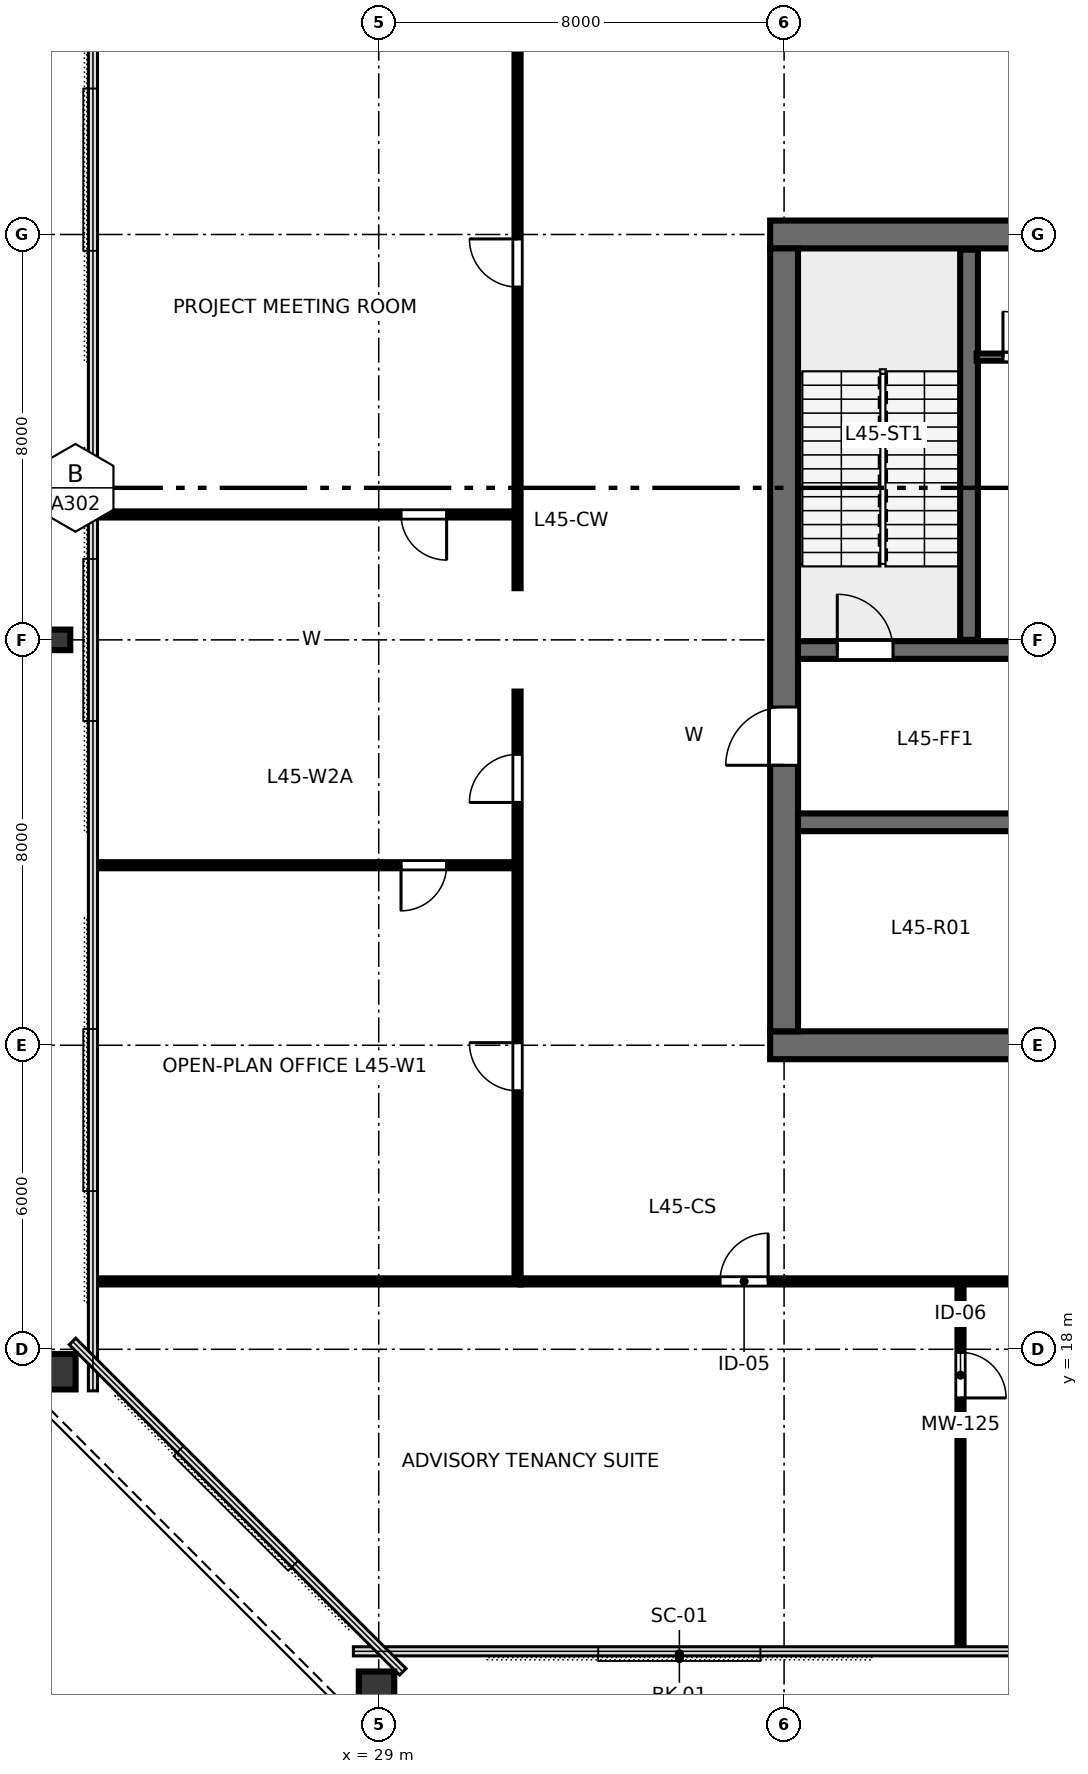
"""IFC4 building model, lengths in metres.
Left out: names, types, materials, properties, quantities, classifications, styles, units other than length and angle.
Written with IfcOpenShell. Run it as: python <this file> out.ifc"""

import sys

from ifc_helpers import new_model, si_unit, direction, frame, frame_2d, origin, origin_2d, place, context, subcontext, project, spatial, rectangle, hollow_rectangle, i_section, extrude, element, fill, save


model = new_model("IFC4")
c1 = context("Model", 3, precision=1e-05, world=origin(), true_north=direction((0.0, 1.0)))
c2 = subcontext(c1, "Body", "Model", "MODEL_VIEW")
j1 = project(units=[si_unit("LENGTHUNIT", "METRE"), si_unit("PLANEANGLEUNIT", "RADIAN")], contexts=[c1])
p1 = place(None, origin())
s1 = spatial("IfcSite", under=j1, at=p1, CompositionType="ELEMENT")
p2 = place(p1, origin())
s2 = spatial("IfcBuilding", under=s1, at=p2, CompositionType="ELEMENT")
p3 = place(p2, frame((0.0, 0.0, 172.0)))
s3 = spatial("IfcBuildingStorey", under=s2, at=p3, CompositionType="ELEMENT", Elevation=172.0)
p4 = place(p3, frame((36.725, 24.0, 0.0), z_axis=(0.0, 0.0, 1.0), x_axis=(1.0, 0.0, 0.0)))
e1 = element("IfcWall", 1, at=p4, inside=s3, PredefinedType="SHEAR", context=c2, shape_type="SweptSolid", body=[
    extrude(rectangle(XDim=18.55, YDim=0.55, at=frame_2d((9.275, 0.0))), origin(), (0.0, 0.0, 1.0), 4.76),
])
p5 = place(p4, frame((8.275, 0.0, 0.0)))
e2 = element("IfcOpeningElement", 2, at=p5, cuts=e1, PredefinedType="OPENING", context=c2, shape_type="SweptSolid", body=[
    extrude(rectangle(XDim=1.6, YDim=2.15, at=frame_2d((0.8, 1.075))), frame((0.0, 0.285, 0.0), z_axis=(0.0, -1.0, 0.0), x_axis=(1.0, 0.0, 0.0)), (0.0, 0.0, 1.0), 0.57),
])
p6 = place(p4, frame((13.675, 0.0, 0.0)))
e3 = element("IfcOpeningElement", 3, at=p6, cuts=e1, PredefinedType="OPENING", context=c2, shape_type="SweptSolid", body=[
    extrude(rectangle(XDim=1.6, YDim=2.15, at=frame_2d((0.8, 1.075))), frame((0.0, 0.285, 0.0), z_axis=(0.0, -1.0, 0.0), x_axis=(1.0, 0.0, 0.0)), (0.0, 0.0, 1.0), 0.57),
])
p7 = place(p3, frame((36.725, 40.0, 0.0), z_axis=(0.0, 0.0, 1.0), x_axis=(1.0, 0.0, 0.0)))
e4 = element("IfcWall", 4, at=p7, inside=s3, PredefinedType="SHEAR", context=c2, shape_type="SweptSolid", body=[
    extrude(rectangle(XDim=18.55, YDim=0.55, at=frame_2d((9.275, 0.0))), origin(), (0.0, 0.0, 1.0), 4.76),
])
p8 = place(p7, frame((8.775, 0.0, 0.0)))
e5 = element("IfcOpeningElement", 5, at=p8, cuts=e4, PredefinedType="OPENING", context=c2, shape_type="SweptSolid", body=[
    extrude(rectangle(XDim=1.0, YDim=2.15, at=frame_2d((0.5, 1.075))), frame((0.0, 0.285, 0.0), z_axis=(0.0, -1.0, 0.0), x_axis=(1.0, 0.0, 0.0)), (0.0, 0.0, 1.0), 0.57),
])
p9 = place(p3, frame((37.0, 24.275, 0.0), z_axis=(0.0, 0.0, 1.0), x_axis=(0.0, 1.0, 0.0)))
e6 = element("IfcWall", 6, at=p9, inside=s3, PredefinedType="SHEAR", context=c2, shape_type="SweptSolid", body=[
    extrude(rectangle(XDim=15.45, YDim=0.55, at=frame_2d((7.725, 0.0))), origin(), (0.0, 0.0, 1.0), 4.76),
])
p10 = place(p9, frame((5.25, 0.0, 0.0)))
e7 = element("IfcOpeningElement", 7, at=p10, cuts=e6, PredefinedType="OPENING", context=c2, shape_type="SweptSolid", body=[
    extrude(rectangle(XDim=1.15, YDim=2.15, at=frame_2d((0.575, 1.075))), frame((0.0, 0.285, 0.0), z_axis=(0.0, -1.0, 0.0), x_axis=(1.0, 0.0, 0.0)), (0.0, 0.0, 1.0), 0.57),
])
p11 = place(p3, frame((37.275, 31.8, 0.0), z_axis=(0.0, 0.0, 1.0), x_axis=(1.0, 0.0, 0.0)))
e8 = element("IfcWall", 8, at=p11, inside=s3, PredefinedType="SHEAR", context=c2, shape_type="SweptSolid", body=[
    extrude(rectangle(XDim=17.45, YDim=0.35, at=frame_2d((8.725, 0.0))), origin(), (0.0, 0.0, 1.0), 4.76),
])
p12 = place(p11, frame((0.775, 0.0, 0.0)))
e9 = element("IfcOpeningElement", 9, at=p12, cuts=e8, PredefinedType="OPENING", context=c2, shape_type="SweptSolid", body=[
    extrude(rectangle(XDim=1.1, YDim=2.15, at=frame_2d((0.55, 1.075))), frame((0.0, 0.185, 0.0), z_axis=(0.0, -1.0, 0.0), x_axis=(1.0, 0.0, 0.0)), (0.0, 0.0, 1.0), 0.37),
])
p13 = place(p11, frame((14.675, 0.0, 0.0)))
e10 = element("IfcOpeningElement", 10, at=p13, cuts=e8, PredefinedType="OPENING", context=c2, shape_type="SweptSolid", body=[
    extrude(rectangle(XDim=1.1, YDim=2.15, at=frame_2d((0.55, 1.075))), frame((0.0, 0.185, 0.0), z_axis=(0.0, -1.0, 0.0), x_axis=(1.0, 0.0, 0.0)), (0.0, 0.0, 1.0), 0.37),
])
p14 = place(p3, frame((37.275, 28.4, 0.0), z_axis=(0.0, 0.0, 1.0), x_axis=(1.0, 0.0, 0.0)))
e11 = element("IfcWall", 11, at=p14, inside=s3, PredefinedType="SHEAR", context=c2, shape_type="SweptSolid", body=[
    extrude(rectangle(XDim=17.45, YDim=0.35, at=frame_2d((8.725, 0.0))), origin(), (0.0, 0.0, 1.0), 4.76),
])
p15 = place(p3, frame((28.957, 11.217, 0.0), z_axis=(0.062460790535, 0.046397982813, 0.996968342946), x_axis=(-0.596311896623, 0.802752839886, 0.0)))
e12 = element("IfcColumn", 12, at=p15, inside=s3, PredefinedType="COLUMN", context=c2, shape_type="SweptSolid", body=[
    extrude(hollow_rectangle(XDim=0.7, YDim=0.85, WallThickness=0.04, at=origin_2d()), origin(), (0.0, 0.0, 1.0), 4.772),
])
p16 = place(p3, frame((22.7, 32.0, 0.0), z_axis=(0.054564800483, 0.0, 0.998510231569), x_axis=(-0.998510231569, 0.0, 0.054564800483)))
e13 = element("IfcColumn", 13, at=p16, inside=s3, PredefinedType="COLUMN", context=c2, shape_type="SweptSolid", body=[
    extrude(i_section(OverallWidth=0.406, OverallDepth=0.425, WebThickness=0.033, FlangeThickness=0.052, FilletRadius=0.025, at=origin_2d()), origin(), (0.0, 0.0, 1.0), 4.765),
])
p17 = place(p3, frame((22.593, 17.558, 0.0), z_axis=(0.054739996676, 0.054074931296, 0.997035322629), x_axis=(-0.709306139229, -0.700688401089, 0.076945210577)))
e14 = element("IfcColumn", 14, at=p17, inside=s3, PredefinedType="COLUMN", context=c2, shape_type="SweptSolid", body=[
    extrude(hollow_rectangle(XDim=0.7, YDim=0.85, WallThickness=0.04, at=origin_2d()), origin(), (0.0, 0.0, 1.0), 4.772),
])
p18 = place(p3, frame((40.65, 32.0, 0.0), z_axis=(0.0, 0.0, 1.0), x_axis=(0.0, 1.0, 0.0)))
e15 = element("IfcWall", 15, at=p18, inside=s3, PredefinedType="SHEAR", context=c2, shape_type="SweptSolid", body=[
    extrude(rectangle(XDim=7.7, YDim=0.35, at=frame_2d((3.85, 0.0))), origin(), (0.0, 0.0, 1.0), 5.0),
])
p19 = place(p3, frame((40.8, 37.58, 0.0), z_axis=(0.0, 0.0, 1.0), x_axis=(1.0, 0.0, 0.0)))
e16 = element("IfcWall", 16, at=p19, inside=s3, PredefinedType="PARTITIONING", context=c2, shape_type="SweptSolid", body=[
    extrude(rectangle(XDim=10.4, YDim=0.14, at=frame_2d((5.2, 0.0))), origin(), (0.0, 0.0, 1.0), 4.76),
])
p20 = place(p19, frame((0.52, 0.0, 0.0)))
e17 = element("IfcOpeningElement", 17, at=p20, cuts=e16, PredefinedType="OPENING", context=c2, shape_type="SweptSolid", body=[
    extrude(rectangle(XDim=0.9, YDim=2.15, at=frame_2d((0.45, 1.075))), frame((0.0, 0.08, 0.0), z_axis=(0.0, -1.0, 0.0), x_axis=(1.0, 0.0, 0.0)), (0.0, 0.0, 1.0), 0.16),
])
p21 = place(p19, frame((2.6, 0.0, 0.0)))
e18 = element("IfcOpeningElement", 18, at=p21, cuts=e16, PredefinedType="OPENING", context=c2, shape_type="SweptSolid", body=[
    extrude(rectangle(XDim=0.9, YDim=2.15, at=frame_2d((0.45, 1.075))), frame((0.0, 0.08, 0.0), z_axis=(0.0, -1.0, 0.0), x_axis=(1.0, 0.0, 0.0)), (0.0, 0.0, 1.0), 0.16),
])
p22 = place(p19, frame((4.68, 0.0, 0.0)))
e19 = element("IfcOpeningElement", 19, at=p22, cuts=e16, PredefinedType="OPENING", context=c2, shape_type="SweptSolid", body=[
    extrude(rectangle(XDim=0.92, YDim=2.15, at=frame_2d((0.46, 1.075))), frame((0.0, 0.08, 0.0), z_axis=(0.0, -1.0, 0.0), x_axis=(1.0, 0.0, 0.0)), (0.0, 0.0, 1.0), 0.16),
])
p23 = place(p19, frame((6.76, 0.0, 0.0)))
e20 = element("IfcOpeningElement", 20, at=p23, cuts=e16, PredefinedType="OPENING", context=c2, shape_type="SweptSolid", body=[
    extrude(rectangle(XDim=0.9, YDim=2.15, at=frame_2d((0.45, 1.075))), frame((0.0, 0.08, 0.0), z_axis=(0.0, -1.0, 0.0), x_axis=(1.0, 0.0, 0.0)), (0.0, 0.0, 1.0), 0.16),
])
p24 = place(p19, frame((8.84, 0.0, 0.0)))
e21 = element("IfcOpeningElement", 21, at=p24, cuts=e16, PredefinedType="OPENING", context=c2, shape_type="SweptSolid", body=[
    extrude(rectangle(XDim=0.9, YDim=2.15, at=frame_2d((0.45, 1.075))), frame((0.0, 0.08, 0.0), z_axis=(0.0, -1.0, 0.0), x_axis=(1.0, 0.0, 0.0)), (0.0, 0.0, 1.0), 0.16),
])
p25 = place(p3, frame((40.482, 19.34, 0.0), z_axis=(0.0, 0.0, 1.0), x_axis=(0.0, -1.0, 0.0)))
e22 = element("IfcWall", 22, at=p25, inside=s3, PredefinedType="MOVABLE", context=c2, shape_type="SweptSolid", body=[
    extrude(rectangle(XDim=7.3, YDim=0.12, at=frame_2d((3.65, 0.0))), origin(), (0.0, 0.0, 1.0), 4.04),
])
p26 = place(p25, frame((1.4, 0.0, 0.0)))
e23 = element("IfcOpeningElement", 23, at=p26, cuts=e22, PredefinedType="OPENING", context=c2, shape_type="SweptSolid", body=[
    extrude(rectangle(XDim=0.9, YDim=2.15, at=frame_2d((0.45, 1.075))), frame((0.0, 0.07, 0.0), z_axis=(0.0, -1.0, 0.0), x_axis=(1.0, 0.0, 0.0)), (0.0, 0.0, 1.0), 0.14),
])
p27 = place(p3, frame((31.8, 19.34, 0.0), z_axis=(0.0, 0.0, 1.0), x_axis=(1.0, 0.0, 0.0)))
e24 = element("IfcWall", 24, at=p27, inside=s3, PredefinedType="PARTITIONING", context=c2, shape_type="SweptSolid", body=[
    extrude(rectangle(XDim=28.4, YDim=0.12, at=frame_2d((14.2, 0.0))), origin(), (0.0, 0.0, 1.0), 4.04),
])
p28 = place(p27, frame((3.936, 0.0, 0.0)))
e25 = element("IfcOpeningElement", 25, at=p28, cuts=e24, PredefinedType="OPENING", context=c2, shape_type="SweptSolid", body=[
    extrude(rectangle(XDim=0.95, YDim=2.15, at=frame_2d((0.475, 1.075))), frame((0.0, 0.07, 0.0), z_axis=(0.0, -1.0, 0.0), x_axis=(1.0, 0.0, 0.0)), (0.0, 0.0, 1.0), 0.14),
])
p29 = place(p27, frame((13.558, 0.0, 0.0)))
e26 = element("IfcOpeningElement", 26, at=p29, cuts=e24, PredefinedType="OPENING", context=c2, shape_type="SweptSolid", body=[
    extrude(rectangle(XDim=0.95, YDim=2.15, at=frame_2d((0.475, 1.075))), frame((0.0, 0.07, 0.0), z_axis=(0.0, -1.0, 0.0), x_axis=(1.0, 0.0, 0.0)), (0.0, 0.0, 1.0), 0.14),
])
p30 = place(p27, frame((23.347, 0.0, 0.0)))
e27 = element("IfcOpeningElement", 27, at=p30, cuts=e24, PredefinedType="OPENING", context=c2, shape_type="SweptSolid", body=[
    extrude(rectangle(XDim=0.95, YDim=2.15, at=frame_2d((0.475, 1.075))), frame((0.0, 0.07, 0.0), z_axis=(0.0, -1.0, 0.0), x_axis=(1.0, 0.0, 0.0)), (0.0, 0.0, 1.0), 0.14),
])
p31 = place(p3, frame((31.74, 27.553, 0.0), z_axis=(0.0, 0.0, 1.0), x_axis=(-1.0, 0.0, 0.0)))
e28 = element("IfcWall", 28, at=p31, inside=s3, PredefinedType="PARTITIONING", context=c2, shape_type="SweptSolid", body=[
    extrude(rectangle(XDim=8.38, YDim=0.12, at=frame_2d((4.19, 0.0))), origin(), (0.0, 0.0, 1.0), 4.04),
])
p32 = place(p31, frame((1.4, 0.0, 0.0)))
e29 = element("IfcOpeningElement", 29, at=p32, cuts=e28, PredefinedType="OPENING", context=c2, shape_type="SweptSolid", body=[
    extrude(rectangle(XDim=0.9, YDim=2.15, at=frame_2d((0.45, 1.075))), frame((0.0, 0.07, 0.0), z_axis=(0.0, -1.0, 0.0), x_axis=(1.0, 0.0, 0.0)), (0.0, 0.0, 1.0), 0.14),
])
p33 = place(p3, frame((31.74, 34.475, 0.0), z_axis=(0.0, 0.0, 1.0), x_axis=(-1.0, 0.0, 0.0)))
e30 = element("IfcWall", 30, at=p33, inside=s3, PredefinedType="PARTITIONING", context=c2, shape_type="SweptSolid", body=[
    extrude(rectangle(XDim=8.38, YDim=0.12, at=frame_2d((4.19, 0.0))), origin(), (0.0, 0.0, 1.0), 4.04),
])
p34 = place(p33, frame((1.4, 0.0, 0.0)))
e31 = element("IfcOpeningElement", 31, at=p34, cuts=e30, PredefinedType="OPENING", context=c2, shape_type="SweptSolid", body=[
    extrude(rectangle(XDim=0.9, YDim=2.15, at=frame_2d((0.45, 1.075))), frame((0.0, 0.07, 0.0), z_axis=(0.0, -1.0, 0.0), x_axis=(1.0, 0.0, 0.0)), (0.0, 0.0, 1.0), 0.14),
])
p35 = place(p3, frame((31.74, 19.4, 0.0), z_axis=(0.0, 0.0, 1.0), x_axis=(0.0, 1.0, 0.0)))
e32 = element("IfcWall", 32, at=p35, inside=s3, PredefinedType="PARTITIONING", context=c2, shape_type="SweptSolid", body=[
    extrude(rectangle(XDim=11.58, YDim=0.12, at=frame_2d((5.79, 0.0))), origin(), (0.0, 0.0, 1.0), 4.04),
])
p36 = place(p35, frame((3.701, 0.0, 0.0)))
e33 = element("IfcOpeningElement", 33, at=p36, cuts=e32, PredefinedType="OPENING", context=c2, shape_type="SweptSolid", body=[
    extrude(rectangle(XDim=0.95, YDim=2.15, at=frame_2d((0.475, 1.075))), frame((0.0, 0.07, 0.0), z_axis=(0.0, -1.0, 0.0), x_axis=(1.0, 0.0, 0.0)), (0.0, 0.0, 1.0), 0.14),
])
p37 = place(p35, frame((9.391, 0.0, 0.0)))
e34 = element("IfcOpeningElement", 34, at=p37, cuts=e32, PredefinedType="OPENING", context=c2, shape_type="SweptSolid", body=[
    extrude(rectangle(XDim=0.95, YDim=2.15, at=frame_2d((0.475, 1.075))), frame((0.0, 0.07, 0.0), z_axis=(0.0, -1.0, 0.0), x_axis=(1.0, 0.0, 0.0)), (0.0, 0.0, 1.0), 0.14),
])
p38 = place(p3, frame((31.74, 33.02, 0.0), z_axis=(0.0, 0.0, 1.0), x_axis=(0.0, 1.0, 0.0)))
e35 = element("IfcWall", 35, at=p38, inside=s3, PredefinedType="PARTITIONING", context=c2, shape_type="SweptSolid", body=[
    extrude(rectangle(XDim=11.58, YDim=0.12, at=frame_2d((5.79, 0.0))), origin(), (0.0, 0.0, 1.0), 4.04),
])
p39 = place(p38, frame((5.943, 0.0, 0.0)))
e36 = element("IfcOpeningElement", 36, at=p39, cuts=e35, PredefinedType="OPENING", context=c2, shape_type="SweptSolid", body=[
    extrude(rectangle(XDim=0.95, YDim=2.15, at=frame_2d((0.475, 1.075))), frame((0.0, 0.07, 0.0), z_axis=(0.0, -1.0, 0.0), x_axis=(1.0, 0.0, 0.0)), (0.0, 0.0, 1.0), 0.14),
])
p40 = place(p3, frame((31.8, 19.34, 0.0), z_axis=(0.0, 0.0, 1.0), x_axis=(-1.0, 0.0, 0.0)))
e37 = element("IfcWall", 37, at=p40, inside=s3, PredefinedType="PARTITIONING", context=c2, shape_type="SweptSolid", body=[
    extrude(rectangle(XDim=8.44, YDim=0.12, at=frame_2d((4.22, 0.0))), origin(), (0.0, 0.0, 1.0), 4.04),
])
p41 = place(p12, origin())
e38 = element("IfcDoor", 38, at=p41, inside=s3, OperationType="SINGLE_SWING_LEFT", PredefinedType="DOOR", context=c2, shape_type="SweptSolid", body=[
    extrude(rectangle(XDim=1.1, YDim=2.15, at=frame_2d((0.55, 1.075))), frame((0.0, 0.025, 0.0), z_axis=(0.0, -1.0, 0.0), x_axis=(1.0, 0.0, 0.0)), (0.0, 0.0, 1.0), 0.05),
])
fill(e9, e38)
p42 = place(p10, origin())
e39 = element("IfcDoor", 39, at=p42, inside=s3, OperationType="SINGLE_SWING_LEFT", PredefinedType="DOOR", context=c2, shape_type="SweptSolid", body=[
    extrude(rectangle(XDim=1.15, YDim=2.15, at=frame_2d((0.575, 1.075))), frame((0.0, 0.025, 0.0), z_axis=(0.0, -1.0, 0.0), x_axis=(1.0, 0.0, 0.0)), (0.0, 0.0, 1.0), 0.05),
])
fill(e7, e39)
p43 = place(p20, origin())
e40 = element("IfcDoor", 40, at=p43, inside=s3, OperationType="SINGLE_SWING_LEFT", PredefinedType="DOOR", context=c2, shape_type="SweptSolid", body=[
    extrude(rectangle(XDim=0.9, YDim=2.15, at=frame_2d((0.45, 1.075))), frame((0.0, 0.025, 0.0), z_axis=(0.0, -1.0, 0.0), x_axis=(1.0, 0.0, 0.0)), (0.0, 0.0, 1.0), 0.05),
])
fill(e17, e40)
p44 = place(p26, origin())
e41 = element("IfcDoor", 41, at=p44, inside=s3, OperationType="SINGLE_SWING_RIGHT", PredefinedType="DOOR", context=c2, shape_type="SweptSolid", body=[
    extrude(rectangle(XDim=0.9, YDim=2.15, at=frame_2d((0.45, 1.075))), frame((0.0, 0.025, 0.0), z_axis=(0.0, -1.0, 0.0), x_axis=(1.0, 0.0, 0.0)), (0.0, 0.0, 1.0), 0.05),
])
fill(e23, e41)
p45 = place(p28, origin())
e42 = element("IfcDoor", 42, at=p45, inside=s3, OperationType="SINGLE_SWING_RIGHT", PredefinedType="DOOR", context=c2, shape_type="SweptSolid", body=[
    extrude(rectangle(XDim=0.95, YDim=2.15, at=frame_2d((0.475, 1.075))), frame((0.0, 0.025, 0.0), z_axis=(0.0, -1.0, 0.0), x_axis=(1.0, 0.0, 0.0)), (0.0, 0.0, 1.0), 0.05),
])
fill(e25, e42)
p46 = place(p32, origin())
e43 = element("IfcDoor", 43, at=p46, inside=s3, OperationType="SINGLE_SWING_RIGHT", PredefinedType="DOOR", context=c2, shape_type="SweptSolid", body=[
    extrude(rectangle(XDim=0.9, YDim=2.15, at=frame_2d((0.45, 1.075))), frame((0.0, 0.025, 0.0), z_axis=(0.0, -1.0, 0.0), x_axis=(1.0, 0.0, 0.0)), (0.0, 0.0, 1.0), 0.05),
])
fill(e29, e43)
p47 = place(p34, origin())
e44 = element("IfcDoor", 44, at=p47, inside=s3, OperationType="SINGLE_SWING_LEFT", PredefinedType="DOOR", context=c2, shape_type="SweptSolid", body=[
    extrude(rectangle(XDim=0.9, YDim=2.15, at=frame_2d((0.45, 1.075))), frame((0.0, 0.025, 0.0), z_axis=(0.0, -1.0, 0.0), x_axis=(1.0, 0.0, 0.0)), (0.0, 0.0, 1.0), 0.05),
])
fill(e31, e44)
p48 = place(p36, origin())
e45 = element("IfcDoor", 45, at=p48, inside=s3, OperationType="SINGLE_SWING_RIGHT", PredefinedType="DOOR", context=c2, shape_type="SweptSolid", body=[
    extrude(rectangle(XDim=0.95, YDim=2.15, at=frame_2d((0.475, 1.075))), frame((0.0, 0.025, 0.0), z_axis=(0.0, -1.0, 0.0), x_axis=(1.0, 0.0, 0.0)), (0.0, 0.0, 1.0), 0.05),
])
fill(e33, e45)
p49 = place(p37, origin())
e46 = element("IfcDoor", 46, at=p49, inside=s3, OperationType="SINGLE_SWING_LEFT", PredefinedType="DOOR", context=c2, shape_type="SweptSolid", body=[
    extrude(rectangle(XDim=0.95, YDim=2.15, at=frame_2d((0.475, 1.075))), frame((0.0, 0.025, 0.0), z_axis=(0.0, -1.0, 0.0), x_axis=(1.0, 0.0, 0.0)), (0.0, 0.0, 1.0), 0.05),
])
fill(e34, e46)
p50 = place(p39, origin())
e47 = element("IfcDoor", 47, at=p50, inside=s3, OperationType="SINGLE_SWING_RIGHT", PredefinedType="DOOR", context=c2, shape_type="SweptSolid", body=[
    extrude(rectangle(XDim=0.95, YDim=2.15, at=frame_2d((0.475, 1.075))), frame((0.0, 0.025, 0.0), z_axis=(0.0, -1.0, 0.0), x_axis=(1.0, 0.0, 0.0)), (0.0, 0.0, 1.0), 0.05),
])
fill(e36, e47)
save(model, sys.argv[1])
